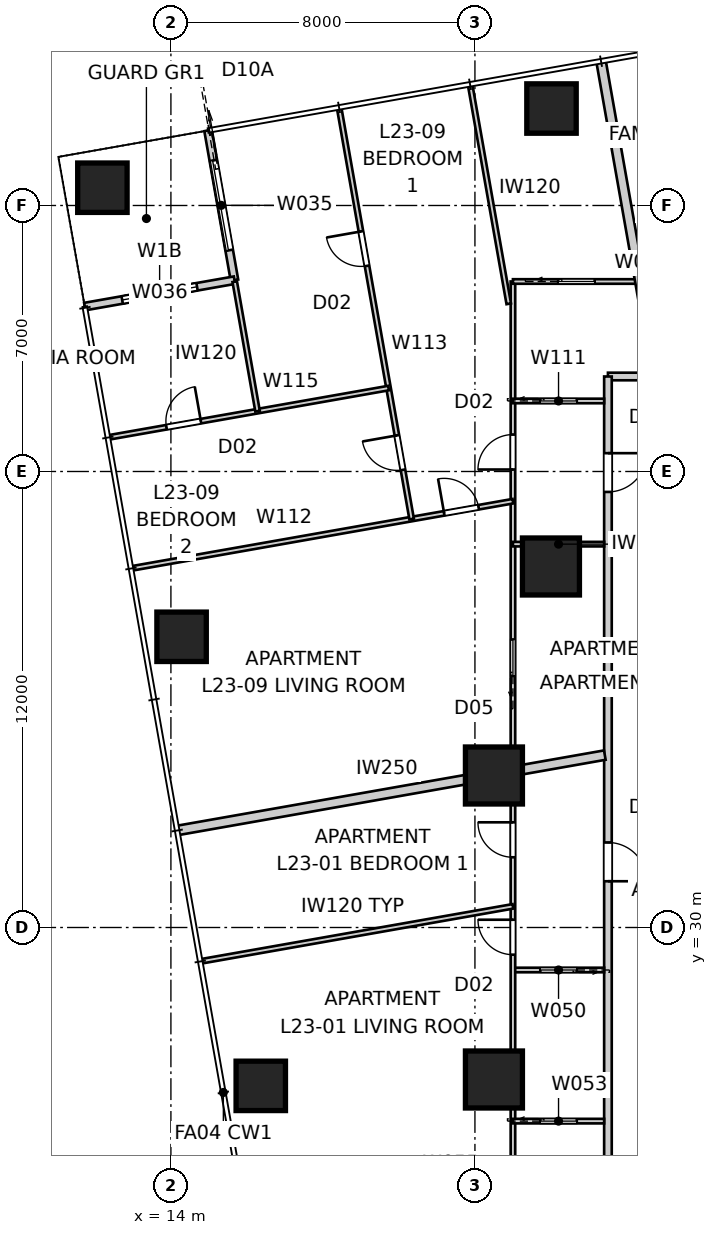
"""IFC4 building model, lengths in metres.
Left out: names, types, materials, properties, quantities, classifications, styles, units other than length and angle.
Written with IfcOpenShell. Run it as: python <this file> out.ifc"""

import sys

from ifc_helpers import new_model, si_unit, direction, frame, frame_2d, origin, origin_2d, place, context, subcontext, project, spatial, rectangle, extrude, element, fill, save


model = new_model("IFC4")
c1 = context("Model", 3, precision=1e-05, world=origin(), true_north=direction((0.0, 1.0)))
c2 = subcontext(c1, "Body", "Model", "MODEL_VIEW")
j1 = project(units=[si_unit("LENGTHUNIT", "METRE"), si_unit("PLANEANGLEUNIT", "RADIAN")], contexts=[c1])
p1 = place(None, origin())
s1 = spatial("IfcSite", under=j1, at=p1, CompositionType="ELEMENT")
p2 = place(p1, origin())
s2 = spatial("IfcBuilding", under=s1, at=p2, CompositionType="ELEMENT")
p3 = place(p2, frame((0.0, 0.0, 86.2)))
s3 = spatial("IfcBuildingStorey", under=s2, at=p3, CompositionType="ELEMENT", Elevation=86.2)
for number, where, z_axis, x_axis in (
    (1, (24.015, 51.552, 0.0), (0.0, 0.0, 1.0), (1.0, 0.0, 0.0)),
    (2, (12.197, 49.468, 0.0), (0.0, 0.0, 1.0), (1.0, 0.0, 0.0)),
    (3, (14.281, 37.65, 0.0), (0.0, 0.0, 1.0), (1.0, 0.0, 0.0)),
    (4, (16.365, 25.833, 0.0), (0.0, 0.0, 1.0), (1.0, 0.0, 0.0)),
):
    element("IfcColumn", number, at=place(p3, frame(where, z_axis=z_axis, x_axis=x_axis)), inside=s3, PredefinedType="COLUMN", context=c2, shape_type="SweptSolid", body=[
        extrude(rectangle(XDim=1.3, YDim=1.3, at=origin_2d()), origin(), (0.0, 0.0, 1.0), 3.4),
    ])
for number, where, z_axis, x_axis in (
    (5, (24.0, 39.5, 0.0), (0.0, 0.0, 1.0), (1.0, 0.0, 0.0)),
    (6, (22.5, 34.0, 0.0), (0.0, 0.0, 1.0), (1.0, 0.0, 0.0)),
    (7, (22.5, 26.0, 0.0), (0.0, 0.0, 1.0), (1.0, 0.0, 0.0)),
):
    element("IfcColumn", number, at=place(p3, frame(where, z_axis=z_axis, x_axis=x_axis)), inside=s3, PredefinedType="COLUMN", context=c2, shape_type="SweptSolid", body=[
        extrude(rectangle(XDim=1.5, YDim=1.5, at=origin_2d()), origin(), (0.0, 0.0, 1.0), 3.4),
    ])
p4 = place(p3, frame((14.978, 50.974, 0.0), z_axis=(0.0, 0.0, 1.0), x_axis=(0.173646056486, -0.984808127031, 0.0)))
e8 = element("IfcWall", 8, at=p4, inside=s3, PredefinedType="SOLIDWALL", context=c2, shape_type="SweptSolid", body=[
    extrude(rectangle(XDim=4.0, YDim=0.2, at=frame_2d((2.0, 0.0))), origin(), (0.0, 0.0, 1.0), 3.25),
])
p5 = place(p4, frame((0.8, 0.0, 0.0)))
e9 = element("IfcOpeningElement", 9, at=p5, cuts=e8, PredefinedType="OPENING", context=c2, shape_type="SweptSolid", body=[
    extrude(rectangle(XDim=2.4, YDim=2.1, at=frame_2d((1.2, 1.05))), frame((0.0, 0.11, 0.0), z_axis=(0.0, -1.0, 0.0), x_axis=(1.0, 0.0, 0.0)), (0.0, 0.0, 1.0), 0.22),
])
p6 = place(p3, frame((15.672, 47.034, 0.0), z_axis=(0.0, 0.0, 1.0), x_axis=(-0.984808127031, -0.173646056486, 0.0)))
e10 = element("IfcWall", 10, at=p6, inside=s3, PredefinedType="SOLIDWALL", context=c2, shape_type="SweptSolid", body=[
    extrude(rectangle(XDim=4.0, YDim=0.2, at=frame_2d((2.0, 0.0))), origin(), (0.0, 0.0, 1.0), 3.25),
])
p7 = place(p6, frame((1.0, 0.0, 0.45)))
e11 = element("IfcOpeningElement", 11, at=p7, cuts=e10, PredefinedType="OPENING", context=c2, shape_type="SweptSolid", body=[
    extrude(rectangle(XDim=2.0, YDim=1.8, at=frame_2d((1.0, 0.9))), frame((0.0, 0.11, 0.0), z_axis=(0.0, -1.0, 0.0), x_axis=(1.0, 0.0, 0.0)), (0.0, 0.0, 1.0), 0.22),
])
p8 = place(p3, frame((54.5, 44.5, 0.0), z_axis=(0.0, 0.0, 1.0), x_axis=(-1.0, 0.0, 0.0)))
e12 = element("IfcWall", 12, at=p8, inside=s3, PredefinedType="PARTITIONING", context=c2, shape_type="SweptSolid", body=[
    extrude(rectangle(XDim=29.0, YDim=0.2, at=frame_2d((14.5, 0.0))), origin(), (0.0, 0.0, 1.0), 3.25),
])
p9 = place(p8, frame((10.129, 0.0, 0.0)))
e13 = element("IfcOpeningElement", 13, at=p9, cuts=e12, PredefinedType="OPENING", context=c2, shape_type="SweptSolid", body=[
    extrude(rectangle(XDim=1.02, YDim=2.34, at=frame_2d((0.51, 1.17))), frame((0.0, 0.11, 0.0), z_axis=(0.0, -1.0, 0.0), x_axis=(1.0, 0.0, 0.0)), (0.0, 0.0, 1.0), 0.22),
])
p10 = place(p8, frame((3.065, 0.0, 0.0)))
e14 = element("IfcOpeningElement", 14, at=p10, cuts=e12, PredefinedType="OPENING", context=c2, shape_type="SweptSolid", body=[
    extrude(rectangle(XDim=1.02, YDim=2.1, at=frame_2d((0.51, 1.05))), frame((0.0, 0.11, 0.0), z_axis=(0.0, -1.0, 0.0), x_axis=(1.0, 0.0, 0.0)), (0.0, 0.0, 1.0), 0.22),
])
p11 = place(p3, frame((25.5, 44.5, 0.0), z_axis=(0.0, 0.0, 1.0), x_axis=(0.0, -1.0, 0.0)))
e15 = element("IfcWall", 15, at=p11, inside=s3, PredefinedType="PARTITIONING", context=c2, shape_type="SweptSolid", body=[
    extrude(rectangle(XDim=29.0, YDim=0.2, at=frame_2d((14.5, 0.0))), origin(), (0.0, 0.0, 1.0), 3.25),
])
p12 = place(p11, frame((12.263, 0.0, 0.0)))
e16 = element("IfcOpeningElement", 16, at=p12, cuts=e15, PredefinedType="OPENING", context=c2, shape_type="SweptSolid", body=[
    extrude(rectangle(XDim=1.02, YDim=2.34, at=frame_2d((0.51, 1.17))), frame((0.0, 0.11, 0.0), z_axis=(0.0, -1.0, 0.0), x_axis=(1.0, 0.0, 0.0)), (0.0, 0.0, 1.0), 0.22),
])
p13 = place(p11, frame((2.018, 0.0, 0.0)))
e17 = element("IfcOpeningElement", 17, at=p13, cuts=e15, PredefinedType="OPENING", context=c2, shape_type="SweptSolid", body=[
    extrude(rectangle(XDim=1.02, YDim=2.34, at=frame_2d((0.51, 1.17))), frame((0.0, 0.11, 0.0), z_axis=(0.0, -1.0, 0.0), x_axis=(1.0, 0.0, 0.0)), (0.0, 0.0, 1.0), 0.22),
])
p14 = place(p3, frame((25.318, 52.797, 0.0), z_axis=(0.0, 0.0, 1.0), x_axis=(0.173651756605, -0.984807121942, 0.0)))
e18 = element("IfcWall", 18, at=p14, inside=s3, PredefinedType="PARTITIONING", context=c2, shape_type="SweptSolid", body=[
    extrude(rectangle(XDim=8.341, YDim=0.25, at=frame_2d((4.171, 0.0))), origin(), (0.0, 0.0, 1.0), 3.25),
])
p15 = place(p3, frame((14.164, 32.552, 0.0), z_axis=(0.0, 0.0, 1.0), x_axis=(0.98481000304, 0.173635416642, 0.0)))
e19 = element("IfcWall", 19, at=p15, inside=s3, PredefinedType="PARTITIONING", context=c2, shape_type="SweptSolid", body=[
    extrude(rectangle(XDim=11.427, YDim=0.25, at=frame_2d((5.713, 0.0))), origin(), (0.0, 0.0, 1.0), 3.25),
])
p16 = place(p3, frame((25.4, 28.882, 0.0), z_axis=(0.0, 0.0, 1.0), x_axis=(-1.0, 0.0, 0.0)))
e20 = element("IfcWall", 20, at=p16, inside=s3, PredefinedType="PARTITIONING", context=c2, shape_type="SweptSolid", body=[
    extrude(rectangle(XDim=2.4, YDim=0.12, at=frame_2d((1.2, 0.0))), origin(), (0.0, 0.0, 1.0), 3.25),
])
p17 = place(p16, frame((0.72, 0.0, 0.0)))
e21 = element("IfcOpeningElement", 21, at=p17, cuts=e20, PredefinedType="OPENING", context=c2, shape_type="SweptSolid", body=[
    extrude(rectangle(XDim=0.96, YDim=2.1, at=frame_2d((0.48, 1.05))), frame((0.0, 0.07, 0.0), z_axis=(0.0, -1.0, 0.0), x_axis=(1.0, 0.0, 0.0)), (0.0, 0.0, 1.0), 0.14),
])
p18 = place(p3, frame((23.0, 13.0, 0.0), z_axis=(0.0, 0.0, 1.0), x_axis=(0.0, 1.0, 0.0)))
e22 = element("IfcWall", 22, at=p18, inside=s3, PredefinedType="PARTITIONING", context=c2, shape_type="SweptSolid", body=[
    extrude(rectangle(XDim=34.0, YDim=0.12, at=frame_2d((17.0, 0.0))), origin(), (0.0, 0.0, 1.0), 2.55),
])
p19 = place(p18, frame((18.848, 0.0, 0.0)))
e23 = element("IfcOpeningElement", 23, at=p19, cuts=e22, PredefinedType="OPENING", context=c2, shape_type="SweptSolid", body=[
    extrude(rectangle(XDim=0.92, YDim=2.34, at=frame_2d((0.46, 1.17))), frame((0.0, 0.07, 0.0), z_axis=(0.0, -1.0, 0.0), x_axis=(1.0, 0.0, 0.0)), (0.0, 0.0, 1.0), 0.14),
])
p20 = place(p18, frame((16.284, 0.0, 0.0)))
e24 = element("IfcOpeningElement", 24, at=p20, cuts=e22, PredefinedType="OPENING", context=c2, shape_type="SweptSolid", body=[
    extrude(rectangle(XDim=0.92, YDim=2.34, at=frame_2d((0.46, 1.17))), frame((0.0, 0.07, 0.0), z_axis=(0.0, -1.0, 0.0), x_axis=(1.0, 0.0, 0.0)), (0.0, 0.0, 1.0), 0.14),
])
p21 = place(p18, frame((29.052, 0.0, 0.0)))
e25 = element("IfcOpeningElement", 25, at=p21, cuts=e22, PredefinedType="OPENING", context=c2, shape_type="SweptSolid", body=[
    extrude(rectangle(XDim=0.92, YDim=2.34, at=frame_2d((0.46, 1.17))), frame((0.0, 0.07, 0.0), z_axis=(0.0, -1.0, 0.0), x_axis=(1.0, 0.0, 0.0)), (0.0, 0.0, 1.0), 0.14),
])
p22 = place(p18, frame((1.196, 0.0, 0.0)))
e26 = element("IfcOpeningElement", 26, at=p22, cuts=e22, PredefinedType="OPENING", context=c2, shape_type="SweptSolid", body=[
    extrude(rectangle(XDim=0.92, YDim=2.34, at=frame_2d((0.46, 1.17))), frame((0.0, 0.07, 0.0), z_axis=(0.0, -1.0, 0.0), x_axis=(1.0, 0.0, 0.0)), (0.0, 0.0, 1.0), 0.14),
])
p23 = place(p18, frame((3.633, 0.0, 0.0)))
e27 = element("IfcOpeningElement", 27, at=p23, cuts=e22, PredefinedType="OPENING", context=c2, shape_type="SweptSolid", body=[
    extrude(rectangle(XDim=0.92, YDim=2.34, at=frame_2d((0.46, 1.17))), frame((0.0, 0.07, 0.0), z_axis=(0.0, -1.0, 0.0), x_axis=(1.0, 0.0, 0.0)), (0.0, 0.0, 1.0), 0.14),
])
p24 = place(p18, frame((23.619, 0.0, 0.0)))
e28 = element("IfcOpeningElement", 28, at=p24, cuts=e22, PredefinedType="OPENING", context=c2, shape_type="SweptSolid", body=[
    extrude(rectangle(XDim=0.96, YDim=2.1, at=frame_2d((0.48, 1.05))), frame((0.0, 0.07, 0.0), z_axis=(0.0, -1.0, 0.0), x_axis=(1.0, 0.0, 0.0)), (0.0, 0.0, 1.0), 0.14),
])
p25 = place(p3, frame((23.0, 24.905, 0.0), z_axis=(0.0, 0.0, 1.0), x_axis=(1.0, 0.0, 0.0)))
e29 = element("IfcWall", 29, at=p25, inside=s3, PredefinedType="PARTITIONING", context=c2, shape_type="SweptSolid", body=[
    extrude(rectangle(XDim=2.4, YDim=0.12, at=frame_2d((1.2, 0.0))), origin(), (0.0, 0.0, 1.0), 3.25),
])
p26 = place(p25, frame((0.72, 0.0, 0.0)))
e30 = element("IfcOpeningElement", 30, at=p26, cuts=e29, PredefinedType="OPENING", context=c2, shape_type="SweptSolid", body=[
    extrude(rectangle(XDim=0.96, YDim=2.1, at=frame_2d((0.48, 1.05))), frame((0.0, 0.07, 0.0), z_axis=(0.0, -1.0, 0.0), x_axis=(1.0, 0.0, 0.0)), (0.0, 0.0, 1.0), 0.14),
])
p27 = place(p3, frame((14.812, 29.113, 0.0), z_axis=(0.0, 0.0, 1.0), x_axis=(0.984807787824, 0.173647980238, 0.0)))
e31 = element("IfcWall", 31, at=p27, inside=s3, PredefinedType="PARTITIONING", context=c2, shape_type="SweptSolid", body=[
    extrude(rectangle(XDim=8.315, YDim=0.12, at=frame_2d((4.157, 0.0))), origin(), (0.0, 0.0, 1.0), 3.25),
])
p28 = place(p3, frame((23.0, 47.0, 0.0), z_axis=(0.0, 0.0, 1.0), x_axis=(1.0, 0.0, 0.0)))
e32 = element("IfcWall", 32, at=p28, inside=s3, PredefinedType="PARTITIONING", context=c2, shape_type="SweptSolid", body=[
    extrude(rectangle(XDim=24.771, YDim=0.12, at=frame_2d((12.386, 0.0))), origin(), (0.0, 0.0, 1.0), 2.55),
])
p29 = place(p28, frame((21.825, 0.0, 0.0)))
e33 = element("IfcOpeningElement", 33, at=p29, cuts=e32, PredefinedType="OPENING", context=c2, shape_type="SweptSolid", body=[
    extrude(rectangle(XDim=0.92, YDim=2.34, at=frame_2d((0.46, 1.17))), frame((0.0, 0.07, 0.0), z_axis=(0.0, -1.0, 0.0), x_axis=(1.0, 0.0, 0.0)), (0.0, 0.0, 1.0), 0.14),
])
p30 = place(p28, frame((11.135, 0.0, 0.0)))
e34 = element("IfcOpeningElement", 34, at=p30, cuts=e32, PredefinedType="OPENING", context=c2, shape_type="SweptSolid", body=[
    extrude(rectangle(XDim=0.96, YDim=2.1, at=frame_2d((0.48, 1.05))), frame((0.0, 0.07, 0.0), z_axis=(0.0, -1.0, 0.0), x_axis=(1.0, 0.0, 0.0)), (0.0, 0.0, 1.0), 0.14),
])
p31 = place(p28, frame((1.19, 0.0, 0.0)))
e35 = element("IfcOpeningElement", 35, at=p31, cuts=e32, PredefinedType="OPENING", context=c2, shape_type="SweptSolid", body=[
    extrude(rectangle(XDim=0.96, YDim=2.1, at=frame_2d((0.48, 1.05))), frame((0.0, 0.07, 0.0), z_axis=(0.0, -1.0, 0.0), x_axis=(1.0, 0.0, 0.0)), (0.0, 0.0, 1.0), 0.14),
])
p32 = place(p28, frame((8.342, 0.0, 0.0)))
e36 = element("IfcOpeningElement", 36, at=p32, cuts=e32, PredefinedType="OPENING", context=c2, shape_type="SweptSolid", body=[
    extrude(rectangle(XDim=0.96, YDim=2.1, at=frame_2d((0.48, 1.05))), frame((0.0, 0.07, 0.0), z_axis=(0.0, -1.0, 0.0), x_axis=(1.0, 0.0, 0.0)), (0.0, 0.0, 1.0), 0.14),
])
p33 = place(p28, frame((4.663, 0.0, 0.0)))
e37 = element("IfcOpeningElement", 37, at=p33, cuts=e32, PredefinedType="OPENING", context=c2, shape_type="SweptSolid", body=[
    extrude(rectangle(XDim=0.96, YDim=2.1, at=frame_2d((0.48, 1.05))), frame((0.0, 0.07, 0.0), z_axis=(0.0, -1.0, 0.0), x_axis=(1.0, 0.0, 0.0)), (0.0, 0.0, 1.0), 0.14),
])
p34 = place(p3, frame((25.4, 40.088, 0.0), z_axis=(0.0, 0.0, 1.0), x_axis=(-1.0, 0.0, 0.0)))
e38 = element("IfcWall", 38, at=p34, inside=s3, PredefinedType="PARTITIONING", context=c2, shape_type="SweptSolid", body=[
    extrude(rectangle(XDim=2.4, YDim=0.12, at=frame_2d((1.2, 0.0))), origin(), (0.0, 0.0, 1.0), 3.25),
])
p35 = place(p3, frame((23.0, 43.856, 0.0), z_axis=(0.0, 0.0, 1.0), x_axis=(1.0, 0.0, 0.0)))
e39 = element("IfcWall", 39, at=p35, inside=s3, PredefinedType="PARTITIONING", context=c2, shape_type="SweptSolid", body=[
    extrude(rectangle(XDim=2.4, YDim=0.12, at=frame_2d((1.2, 0.0))), origin(), (0.0, 0.0, 1.0), 3.25),
])
p36 = place(p35, frame((0.72, 0.0, 0.0)))
e40 = element("IfcOpeningElement", 40, at=p36, cuts=e39, PredefinedType="OPENING", context=c2, shape_type="SweptSolid", body=[
    extrude(rectangle(XDim=0.96, YDim=2.1, at=frame_2d((0.48, 1.05))), frame((0.0, 0.07, 0.0), z_axis=(0.0, -1.0, 0.0), x_axis=(1.0, 0.0, 0.0)), (0.0, 0.0, 1.0), 0.14),
])
p37 = place(p3, frame((12.988, 39.453, 0.0), z_axis=(0.0, 0.0, 1.0), x_axis=(0.984807724889, 0.173648337162, 0.0)))
e41 = element("IfcWall", 41, at=p37, inside=s3, PredefinedType="PARTITIONING", context=c2, shape_type="SweptSolid", body=[
    extrude(rectangle(XDim=10.167, YDim=0.12, at=frame_2d((5.083, 0.0))), origin(), (0.0, 0.0, 1.0), 2.638),
])
p38 = place(p37, frame((8.328, 0.0, 0.0)))
e42 = element("IfcOpeningElement", 42, at=p38, cuts=e41, PredefinedType="OPENING", context=c2, shape_type="SweptSolid", body=[
    extrude(rectangle(XDim=0.92, YDim=2.34, at=frame_2d((0.46, 1.17))), frame((0.0, 0.07, 0.0), z_axis=(0.0, -1.0, 0.0), x_axis=(1.0, 0.0, 0.0)), (0.0, 0.0, 1.0), 0.14),
])
p39 = place(p3, frame((20.335, 40.749, 0.0), z_axis=(0.0, 0.0, 1.0), x_axis=(-0.173639194339, 0.984809336973, 0.0)))
e43 = element("IfcWall", 43, at=p39, inside=s3, PredefinedType="PARTITIONING", context=c2, shape_type="SweptSolid", body=[
    extrude(rectangle(XDim=10.96, YDim=0.12, at=frame_2d((5.48, 0.0))), origin(), (0.0, 0.0, 1.0), 3.25),
])
p40 = place(p39, frame((6.765, 0.0, 0.0)))
e44 = element("IfcOpeningElement", 44, at=p40, cuts=e43, PredefinedType="OPENING", context=c2, shape_type="SweptSolid", body=[
    extrude(rectangle(XDim=0.92, YDim=2.34, at=frame_2d((0.46, 1.17))), frame((0.0, 0.07, 0.0), z_axis=(0.0, -1.0, 0.0), x_axis=(1.0, 0.0, 0.0)), (0.0, 0.0, 1.0), 0.14),
])
p41 = place(p39, frame((1.315, 0.0, 0.0)))
e45 = element("IfcOpeningElement", 45, at=p41, cuts=e43, PredefinedType="OPENING", context=c2, shape_type="SweptSolid", body=[
    extrude(rectangle(XDim=0.92, YDim=2.34, at=frame_2d((0.46, 1.17))), frame((0.0, 0.07, 0.0), z_axis=(0.0, -1.0, 0.0), x_axis=(1.0, 0.0, 0.0)), (0.0, 0.0, 1.0), 0.14),
])
p42 = place(p3, frame((21.878, 52.15, 0.0), z_axis=(0.0, 0.0, 1.0), x_axis=(0.173634707655, -0.984810128044, 0.0)))
e46 = element("IfcWall", 46, at=p42, inside=s3, PredefinedType="PARTITIONING", context=c2, shape_type="SweptSolid", body=[
    extrude(rectangle(XDim=5.825, YDim=0.12, at=frame_2d((2.913, 0.0))), origin(), (0.0, 0.0, 1.0), 2.638),
])
p43 = place(p3, frame((12.38, 42.9, 0.0), z_axis=(0.0, 0.0, 1.0), x_axis=(0.984807929323, 0.173647177755, 0.0)))
e47 = element("IfcWall", 47, at=p43, inside=s3, PredefinedType="PARTITIONING", context=c2, shape_type="SweptSolid", body=[
    extrude(rectangle(XDim=7.46, YDim=0.12, at=frame_2d((3.73, 0.0))), origin(), (0.0, 0.0, 1.0), 3.25),
])
p44 = place(p43, frame((1.525, 0.0, 0.0)))
e48 = element("IfcOpeningElement", 48, at=p44, cuts=e47, PredefinedType="OPENING", context=c2, shape_type="SweptSolid", body=[
    extrude(rectangle(XDim=0.92, YDim=2.34, at=frame_2d((0.46, 1.17))), frame((0.0, 0.07, 0.0), z_axis=(0.0, -1.0, 0.0), x_axis=(1.0, 0.0, 0.0)), (0.0, 0.0, 1.0), 0.14),
])
p45 = place(p3, frame((16.28, 43.588, 0.0), z_axis=(0.0, 0.0, 1.0), x_axis=(-0.173660541335, 0.984805572884, 0.0)))
e49 = element("IfcWall", 49, at=p45, inside=s3, PredefinedType="PARTITIONING", context=c2, shape_type="SweptSolid", body=[
    extrude(rectangle(XDim=3.46, YDim=0.12, at=frame_2d((1.73, 0.0))), origin(), (0.0, 0.0, 1.0), 3.25),
])
p46 = place(p5, origin())
e50 = element("IfcDoor", 50, at=p46, inside=s3, OperationType="SLIDING_TO_LEFT", PredefinedType="DOOR", context=c2, shape_type="SweptSolid", body=[
    extrude(rectangle(XDim=2.4, YDim=2.1, at=frame_2d((1.2, 1.05))), frame((0.0, 0.025, 0.0), z_axis=(0.0, -1.0, 0.0), x_axis=(1.0, 0.0, 0.0)), (0.0, 0.0, 1.0), 0.05),
])
fill(e9, e50)
p47 = place(p7, origin())
e51 = element("IfcWindow", 51, at=p47, inside=s3, PartitioningType="SINGLE_PANEL", PredefinedType="WINDOW", context=c2, shape_type="SweptSolid", body=[
    extrude(rectangle(XDim=2.0, YDim=1.8, at=frame_2d((1.0, 0.9))), frame((0.0, 0.03, 0.0), z_axis=(0.0, -1.0, 0.0), x_axis=(1.0, 0.0, 0.0)), (0.0, 0.0, 1.0), 0.06),
])
fill(e11, e51)
p48 = place(p12, origin())
e52 = element("IfcDoor", 52, at=p48, inside=s3, OperationType="SINGLE_SWING_RIGHT", PredefinedType="DOOR", context=c2, shape_type="SweptSolid", body=[
    extrude(rectangle(XDim=1.02, YDim=2.34, at=frame_2d((0.51, 1.17))), frame((0.0, 0.025, 0.0), z_axis=(0.0, -1.0, 0.0), x_axis=(1.0, 0.0, 0.0)), (0.0, 0.0, 1.0), 0.05),
])
fill(e16, e52)
p49 = place(p13, origin())
e53 = element("IfcDoor", 53, at=p49, inside=s3, OperationType="SINGLE_SWING_LEFT", PredefinedType="DOOR", context=c2, shape_type="SweptSolid", body=[
    extrude(rectangle(XDim=1.02, YDim=2.34, at=frame_2d((0.51, 1.17))), frame((0.0, 0.025, 0.0), z_axis=(0.0, -1.0, 0.0), x_axis=(1.0, 0.0, 0.0)), (0.0, 0.0, 1.0), 0.05),
])
fill(e17, e53)
p50 = place(p19, origin())
e54 = element("IfcDoor", 54, at=p50, inside=s3, OperationType="SINGLE_SWING_RIGHT", PredefinedType="DOOR", context=c2, shape_type="SweptSolid", body=[
    extrude(rectangle(XDim=0.92, YDim=2.34, at=frame_2d((0.46, 1.17))), frame((0.0, 0.025, 0.0), z_axis=(0.0, -1.0, 0.0), x_axis=(1.0, 0.0, 0.0)), (0.0, 0.0, 1.0), 0.05),
])
fill(e23, e54)
p51 = place(p17, origin())
e55 = element("IfcDoor", 55, at=p51, inside=s3, OperationType="SLIDING_TO_LEFT", PredefinedType="DOOR", context=c2, shape_type="SweptSolid", body=[
    extrude(rectangle(XDim=0.96, YDim=2.1, at=frame_2d((0.48, 1.05))), frame((0.0, 0.025, 0.0), z_axis=(0.0, -1.0, 0.0), x_axis=(1.0, 0.0, 0.0)), (0.0, 0.0, 1.0), 0.05),
])
fill(e21, e55)
p52 = place(p20, origin())
e56 = element("IfcDoor", 56, at=p52, inside=s3, OperationType="SINGLE_SWING_RIGHT", PredefinedType="DOOR", context=c2, shape_type="SweptSolid", body=[
    extrude(rectangle(XDim=0.92, YDim=2.34, at=frame_2d((0.46, 1.17))), frame((0.0, 0.025, 0.0), z_axis=(0.0, -1.0, 0.0), x_axis=(1.0, 0.0, 0.0)), (0.0, 0.0, 1.0), 0.05),
])
fill(e24, e56)
p53 = place(p21, origin())
e57 = element("IfcDoor", 57, at=p53, inside=s3, OperationType="SINGLE_SWING_LEFT", PredefinedType="DOOR", context=c2, shape_type="SweptSolid", body=[
    extrude(rectangle(XDim=0.92, YDim=2.34, at=frame_2d((0.46, 1.17))), frame((0.0, 0.025, 0.0), z_axis=(0.0, -1.0, 0.0), x_axis=(1.0, 0.0, 0.0)), (0.0, 0.0, 1.0), 0.05),
])
fill(e25, e57)
p54 = place(p36, origin())
e58 = element("IfcDoor", 58, at=p54, inside=s3, OperationType="SLIDING_TO_LEFT", PredefinedType="DOOR", context=c2, shape_type="SweptSolid", body=[
    extrude(rectangle(XDim=0.96, YDim=2.1, at=frame_2d((0.48, 1.05))), frame((0.0, 0.025, 0.0), z_axis=(0.0, -1.0, 0.0), x_axis=(1.0, 0.0, 0.0)), (0.0, 0.0, 1.0), 0.05),
])
fill(e40, e58)
p55 = place(p26, origin())
e59 = element("IfcDoor", 59, at=p55, inside=s3, OperationType="SLIDING_TO_LEFT", PredefinedType="DOOR", context=c2, shape_type="SweptSolid", body=[
    extrude(rectangle(XDim=0.96, YDim=2.1, at=frame_2d((0.48, 1.05))), frame((0.0, 0.025, 0.0), z_axis=(0.0, -1.0, 0.0), x_axis=(1.0, 0.0, 0.0)), (0.0, 0.0, 1.0), 0.05),
])
fill(e30, e59)
p56 = place(p31, origin())
e60 = element("IfcDoor", 60, at=p56, inside=s3, OperationType="SLIDING_TO_LEFT", PredefinedType="DOOR", context=c2, shape_type="SweptSolid", body=[
    extrude(rectangle(XDim=0.96, YDim=2.1, at=frame_2d((0.48, 1.05))), frame((0.0, 0.025, 0.0), z_axis=(0.0, -1.0, 0.0), x_axis=(1.0, 0.0, 0.0)), (0.0, 0.0, 1.0), 0.05),
])
fill(e35, e60)
p57 = place(p40, origin())
e61 = element("IfcDoor", 61, at=p57, inside=s3, OperationType="SINGLE_SWING_RIGHT", PredefinedType="DOOR", context=c2, shape_type="SweptSolid", body=[
    extrude(rectangle(XDim=0.92, YDim=2.34, at=frame_2d((0.46, 1.17))), frame((0.0, 0.025, 0.0), z_axis=(0.0, -1.0, 0.0), x_axis=(1.0, 0.0, 0.0)), (0.0, 0.0, 1.0), 0.05),
])
fill(e44, e61)
p58 = place(p41, origin())
e62 = element("IfcDoor", 62, at=p58, inside=s3, OperationType="SINGLE_SWING_RIGHT", PredefinedType="DOOR", context=c2, shape_type="SweptSolid", body=[
    extrude(rectangle(XDim=0.92, YDim=2.34, at=frame_2d((0.46, 1.17))), frame((0.0, 0.025, 0.0), z_axis=(0.0, -1.0, 0.0), x_axis=(1.0, 0.0, 0.0)), (0.0, 0.0, 1.0), 0.05),
])
fill(e45, e62)
p59 = place(p38, origin())
e63 = element("IfcDoor", 63, at=p59, inside=s3, OperationType="SINGLE_SWING_LEFT", PredefinedType="DOOR", context=c2, shape_type="SweptSolid", body=[
    extrude(rectangle(XDim=0.92, YDim=2.34, at=frame_2d((0.46, 1.17))), frame((0.0, 0.025, 0.0), z_axis=(0.0, -1.0, 0.0), x_axis=(1.0, 0.0, 0.0)), (0.0, 0.0, 1.0), 0.05),
])
fill(e42, e63)
p60 = place(p24, origin())
e64 = element("IfcDoor", 64, at=p60, inside=s3, OperationType="SLIDING_TO_LEFT", PredefinedType="DOOR", context=c2, shape_type="SweptSolid", body=[
    extrude(rectangle(XDim=0.96, YDim=2.1, at=frame_2d((0.48, 1.05))), frame((0.0, 0.025, 0.0), z_axis=(0.0, -1.0, 0.0), x_axis=(1.0, 0.0, 0.0)), (0.0, 0.0, 1.0), 0.05),
])
fill(e28, e64)
p61 = place(p44, origin())
e65 = element("IfcDoor", 65, at=p61, inside=s3, OperationType="SINGLE_SWING_RIGHT", PredefinedType="DOOR", context=c2, shape_type="SweptSolid", body=[
    extrude(rectangle(XDim=0.92, YDim=2.34, at=frame_2d((0.46, 1.17))), frame((0.0, 0.025, 0.0), z_axis=(0.0, -1.0, 0.0), x_axis=(1.0, 0.0, 0.0)), (0.0, 0.0, 1.0), 0.05),
])
fill(e48, e65)
save(model, sys.argv[1])
